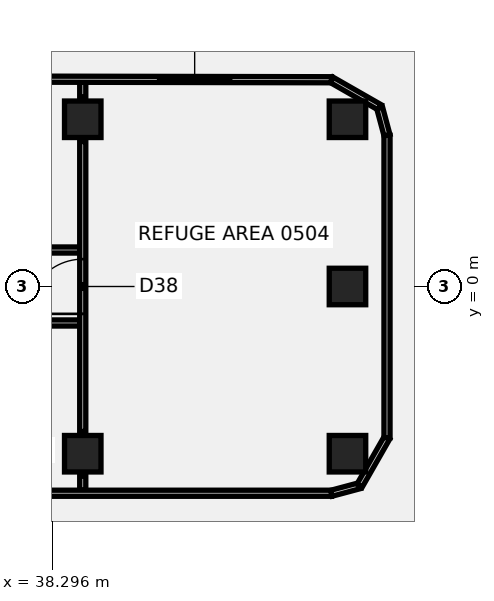
"""IFC4 building model, lengths in metres.
Left out: names, types, materials, properties, quantities, classifications, styles, units other than length and angle.
Written with IfcOpenShell. Run it as: python <this file> out.ifc"""

import sys

from ifc_helpers import new_model, si_unit, direction, frame, frame_2d, origin, origin_2d, place, context, subcontext, project, spatial, rectangle, extrude, element, fill, save


model = new_model("IFC4")
c1 = context("Model", 3, precision=1e-05, world=origin(), true_north=direction((0.0, 1.0)))
c2 = subcontext(c1, "Body", "Model", "MODEL_VIEW")
j1 = project(units=[si_unit("LENGTHUNIT", "METRE"), si_unit("PLANEANGLEUNIT", "RADIAN")], contexts=[c1])
p1 = place(None, origin())
s1 = spatial("IfcSite", under=j1, at=p1, CompositionType="ELEMENT")
p2 = place(p1, origin())
s2 = spatial("IfcBuilding", under=s1, at=p2, CompositionType="ELEMENT")
p3 = place(p2, frame((0.0, 0.0, 29.5)))
s3 = spatial("IfcBuildingStorey", under=s2, at=p3, CompositionType="ELEMENT", Elevation=29.5)
p4 = place(p3, frame((39.3, 5.5, -0.6), z_axis=(0.0, 0.0, 1.0), x_axis=(1.0, 0.0, 0.0)))
e1 = element("IfcColumn", 1, at=p4, inside=s3, PredefinedType="COLUMN", context=c2, shape_type="SweptSolid", body=[
    extrude(rectangle(XDim=1.2, YDim=1.2, at=origin_2d()), origin(), (0.0, 0.0, 1.0), 4.926),
])
p5 = place(p3, frame((39.3, -5.5, -0.6), z_axis=(0.0, 0.0, 1.0), x_axis=(1.0, 0.0, 0.0)))
e2 = element("IfcColumn", 2, at=p5, inside=s3, PredefinedType="COLUMN", context=c2, shape_type="SweptSolid", body=[
    extrude(rectangle(XDim=1.2, YDim=1.2, at=origin_2d()), origin(), (0.0, 0.0, 1.0), 4.926),
])
p6 = place(p3, frame((48.008, -5.5, -0.6), z_axis=(0.0, 0.0, 1.0), x_axis=(1.0, 0.0, 0.0)))
e3 = element("IfcColumn", 3, at=p6, inside=s3, PredefinedType="COLUMN", context=c2, shape_type="SweptSolid", body=[
    extrude(rectangle(XDim=1.2, YDim=1.2, at=origin_2d()), origin(), (0.0, 0.0, 1.0), 4.918),
])
p7 = place(p3, frame((48.008, 0.0, -0.6), z_axis=(0.0, 0.0, 1.0), x_axis=(1.0, 0.0, 0.0)))
e4 = element("IfcColumn", 4, at=p7, inside=s3, PredefinedType="COLUMN", context=c2, shape_type="SweptSolid", body=[
    extrude(rectangle(XDim=1.2, YDim=1.2, at=origin_2d()), origin(), (0.0, 0.0, 1.0), 4.917),
])
p8 = place(p3, frame((48.008, 5.5, -0.6), z_axis=(0.0, 0.0, 1.0), x_axis=(1.0, 0.0, 0.0)))
e5 = element("IfcColumn", 5, at=p8, inside=s3, PredefinedType="COLUMN", context=c2, shape_type="SweptSolid", body=[
    extrude(rectangle(XDim=1.2, YDim=1.2, at=origin_2d()), origin(), (0.0, 0.0, 1.0), 4.909),
])
p9 = place(p3, frame((36.54, -1.2, 0.0), z_axis=(0.0, 0.0, 1.0), x_axis=(1.0, 0.0, 0.0)))
e6 = element("IfcWall", 6, at=p9, inside=s3, PredefinedType="PARTITIONING", context=c2, shape_type="SweptSolid", body=[
    extrude(rectangle(XDim=2.68, YDim=0.2, at=frame_2d((1.34, 0.0))), origin(), (0.0, 0.0, 1.0), 3.76),
])
p10 = place(p3, frame((25.885, 1.2, 0.0), z_axis=(0.0, 0.0, 1.0), x_axis=(1.0, 0.0, 0.0)))
e7 = element("IfcWall", 7, at=p10, inside=s3, PredefinedType="PARTITIONING", context=c2, shape_type="SweptSolid", body=[
    extrude(rectangle(XDim=13.335, YDim=0.2, at=frame_2d((6.667, 0.0))), origin(), (0.0, 0.0, 1.0), 3.76),
])
p11 = place(p10, frame((7.415, 0.0, 0.0)))
e8 = element("IfcOpeningElement", 8, at=p11, cuts=e7, PredefinedType="OPENING", context=c2, shape_type="SweptSolid", body=[
    extrude(rectangle(XDim=1.8, YDim=2.1, at=frame_2d((0.9, 1.05))), frame((0.0, 0.11, 0.0), z_axis=(0.0, -1.0, 0.0), x_axis=(1.0, 0.0, 0.0)), (0.0, 0.0, 1.0), 0.22),
])
p12 = place(p3, frame((39.3, -6.699, 0.0), z_axis=(0.0, 0.0, 1.0), x_axis=(0.0, 1.0, 0.0)))
e9 = element("IfcWall", 9, at=p12, inside=s3, PredefinedType="PARTITIONING", context=c2, shape_type="SweptSolid", body=[
    extrude(rectangle(XDim=0.469, YDim=0.2, at=frame_2d((0.234, 0.0))), origin(), (0.0, 0.0, 1.0), 3.76),
])
p13 = place(p3, frame((39.3, -4.77, 0.0), z_axis=(0.0, 0.0, 1.0), x_axis=(0.0, 1.0, 0.0)))
e10 = element("IfcWall", 10, at=p13, inside=s3, PredefinedType="PARTITIONING", context=c2, shape_type="SweptSolid", body=[
    extrude(rectangle(XDim=9.54, YDim=0.2, at=frame_2d((4.77, 0.0))), origin(), (0.0, 0.0, 1.0), 3.76),
])
p14 = place(p13, frame((3.87, 0.0, 0.0)))
e11 = element("IfcOpeningElement", 11, at=p14, cuts=e10, PredefinedType="OPENING", context=c2, shape_type="SweptSolid", body=[
    extrude(rectangle(XDim=1.8, YDim=2.1, at=frame_2d((0.9, 1.05))), frame((0.0, 0.11, 0.0), z_axis=(0.0, -1.0, 0.0), x_axis=(1.0, 0.0, 0.0)), (0.0, 0.0, 1.0), 0.22),
])
p15 = place(p3, frame((39.3, 6.23, 0.0), z_axis=(0.0, 0.0, 1.0), x_axis=(0.0, 1.0, 0.0)))
e12 = element("IfcWall", 12, at=p15, inside=s3, PredefinedType="PARTITIONING", context=c2, shape_type="SweptSolid", body=[
    extrude(rectangle(XDim=0.485, YDim=0.2, at=frame_2d((0.243, 0.0))), origin(), (0.0, 0.0, 1.0), 3.76),
])
p16 = place(p3, frame((25.181, -6.8, 0.0), z_axis=(0.0, 0.0, 1.0), x_axis=(1.0, 0.0, 0.0)))
e13 = element("IfcWall", 13, at=p16, inside=s3, PredefinedType="SOLIDWALL", context=c2, shape_type="SweptSolid", body=[
    extrude(rectangle(XDim=22.3, YDim=0.2, at=frame_2d((11.15, 0.0))), origin(), (0.0, 0.0, 1.0), 4.36),
])
p17 = place(p16, frame((0.9, 0.0, 1.4)))
e14 = element("IfcOpeningElement", 14, at=p17, cuts=e13, PredefinedType="OPENING", context=c2, shape_type="SweptSolid", body=[
    extrude(rectangle(XDim=2.4, YDim=2.1, at=frame_2d((1.2, 1.05))), frame((0.0, 0.11, 0.0), z_axis=(0.0, -1.0, 0.0), x_axis=(1.0, 0.0, 0.0)), (0.0, 0.0, 1.0), 0.22),
])
p18 = place(p3, frame((47.481, -6.8, 0.0), z_axis=(0.0, 0.0, 1.0), x_axis=(0.96591611198, 0.258855296676, 0.0)))
e15 = element("IfcWall", 15, at=p18, inside=s3, PredefinedType="SOLIDWALL", context=c2, shape_type="SweptSolid", body=[
    extrude(rectangle(XDim=0.955, YDim=0.2, at=frame_2d((0.478, 0.0))), origin(), (0.0, 0.0, 1.0), 4.36),
])
p19 = place(p3, frame((48.404, -6.553, 0.0), z_axis=(0.0, 0.0, 1.0), x_axis=(0.496644654848, 0.867953965836, 0.0)))
e16 = element("IfcWall", 16, at=p19, inside=s3, PredefinedType="SOLIDWALL", context=c2, shape_type="SweptSolid", body=[
    extrude(rectangle(XDim=1.819, YDim=0.2, at=frame_2d((0.91, 0.0))), origin(), (0.0, 0.0, 1.0), 4.36),
])
p20 = place(p3, frame((49.308, -4.974, 0.0), z_axis=(0.0, 0.0, 1.0), x_axis=(0.0, 1.0, 0.0)))
e17 = element("IfcWall", 17, at=p20, inside=s3, PredefinedType="SOLIDWALL", context=c2, shape_type="SweptSolid", body=[
    extrude(rectangle(XDim=9.947, YDim=0.2, at=frame_2d((4.974, 0.0))), origin(), (0.0, 0.0, 1.0), 4.36),
])
p21 = place(p3, frame((49.308, 4.974, 0.0), z_axis=(0.0, 0.0, 1.0), x_axis=(-0.258855296676, 0.96591611198, 0.0)))
e18 = element("IfcWall", 18, at=p21, inside=s3, PredefinedType="SOLIDWALL", context=c2, shape_type="SweptSolid", body=[
    extrude(rectangle(XDim=0.955, YDim=0.2, at=frame_2d((0.478, 0.0))), origin(), (0.0, 0.0, 1.0), 4.36),
])
p22 = place(p3, frame((49.06, 5.896, 0.0), z_axis=(0.0, 0.0, 1.0), x_axis=(-0.867987059309, 0.496586815041, 0.0)))
e19 = element("IfcWall", 19, at=p22, inside=s3, PredefinedType="SOLIDWALL", context=c2, shape_type="SweptSolid", body=[
    extrude(rectangle(XDim=1.82, YDim=0.2, at=frame_2d((0.91, 0.0))), origin(), (0.0, 0.0, 1.0), 4.36),
])
p23 = place(p3, frame((47.481, 6.8, 0.0), z_axis=(0.0, 0.0, 1.0), x_axis=(-0.999998066603, 0.001966415802, 0.0)))
e20 = element("IfcWall", 20, at=p23, inside=s3, PredefinedType="SOLIDWALL", context=c2, shape_type="SweptSolid", body=[
    extrude(rectangle(XDim=22.596, YDim=0.2, at=frame_2d((11.298, 0.0))), origin(), (0.0, 0.0, 1.0), 4.36),
])
p24 = place(p23, frame((3.3, 0.0, 1.4)))
e21 = element("IfcOpeningElement", 21, at=p24, cuts=e20, PredefinedType="OPENING", context=c2, shape_type="SweptSolid", body=[
    extrude(rectangle(XDim=2.4, YDim=2.1, at=frame_2d((1.2, 1.05))), frame((0.0, 0.11, 0.0), z_axis=(0.0, -1.0, 0.0), x_axis=(1.0, 0.0, 0.0)), (0.0, 0.0, 1.0), 0.22),
])
p25 = place(p23, frame((13.75, 0.0, 1.4)))
e22 = element("IfcOpeningElement", 22, at=p25, cuts=e20, PredefinedType="OPENING", context=c2, shape_type="SweptSolid", body=[
    extrude(rectangle(XDim=2.4, YDim=2.1, at=frame_2d((1.2, 1.05))), frame((0.0, 0.11, 0.0), z_axis=(0.0, -1.0, 0.0), x_axis=(1.0, 0.0, 0.0)), (0.0, 0.0, 1.0), 0.22),
])
p26 = place(p14, frame((1.8, 0.0, 0.0), z_axis=(0.0, 0.0, 1.0), x_axis=(-1.0, 0.0, 0.0)))
e23 = element("IfcDoor", 23, at=p26, inside=s3, OperationType="DOUBLE_DOOR_SINGLE_SWING", PredefinedType="DOOR", context=c2, shape_type="SweptSolid", body=[
    extrude(rectangle(XDim=1.8, YDim=2.1, at=frame_2d((0.9, 1.05))), frame((0.0, 0.025, 0.0), z_axis=(0.0, -1.0, 0.0), x_axis=(1.0, 0.0, 0.0)), (0.0, 0.0, 1.0), 0.05),
])
fill(e11, e23)
p27 = place(p24, origin())
e24 = element("IfcWindow", 24, at=p27, inside=s3, PartitioningType="SINGLE_PANEL", PredefinedType="WINDOW", context=c2, shape_type="SweptSolid", body=[
    extrude(rectangle(XDim=2.4, YDim=2.1, at=frame_2d((1.2, 1.05))), frame((0.0, 0.03, 0.0), z_axis=(0.0, -1.0, 0.0), x_axis=(1.0, 0.0, 0.0)), (0.0, 0.0, 1.0), 0.06),
])
fill(e21, e24)
save(model, sys.argv[1])
